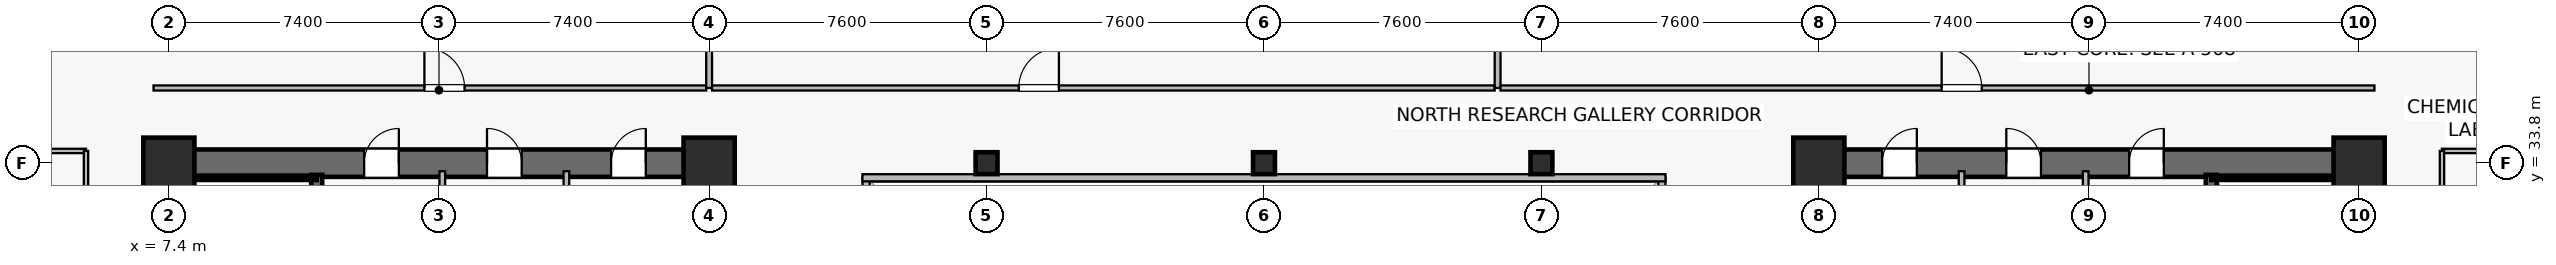
"""IFC4 building model, lengths in metres.
Left out: names, types, materials, properties, quantities, classifications, styles, units other than length and angle.
Written with IfcOpenShell. Run it as: python <this file> out.ifc"""

import sys

from ifc_helpers import new_model, si_unit, direction, frame, frame_2d, origin, origin_2d, place, context, subcontext, project, spatial, rectangle, hollow_rectangle, extrude, source, transform, mapped, element, fill, save


model = new_model("IFC4")
c1 = context("Model", 3, precision=1e-05, world=origin(), true_north=direction((0.0, 1.0)))
c2 = subcontext(c1, "Body", "Model", "MODEL_VIEW")
j1 = project(units=[si_unit("LENGTHUNIT", "METRE"), si_unit("PLANEANGLEUNIT", "RADIAN")], contexts=[c1])
p1 = place(None, origin())
s1 = spatial("IfcSite", under=j1, at=p1, CompositionType="ELEMENT")
p2 = place(p1, origin())
s2 = spatial("IfcBuilding", under=s1, at=p2, CompositionType="ELEMENT")
p3 = place(p2, frame((0.0, 0.0, 45.7)))
s3 = spatial("IfcBuildingStorey", under=s2, at=p3, CompositionType="ELEMENT", Elevation=45.7)
p4 = place(p3, frame((7.025, 33.8, 0.0), z_axis=(0.0, 0.0, 1.0), x_axis=(1.0, 0.0, 0.0)))
e1 = element("IfcWall", 1, at=p4, inside=s3, PredefinedType="SHEAR", context=c2, shape_type="SweptSolid", body=[
    extrude(rectangle(XDim=15.55, YDim=0.75, at=frame_2d((7.775, 0.0))), origin(), (0.0, 0.0, 1.0), 3.78),
])
p5 = place(p4, frame((5.725, 0.0, 0.0)))
e2 = element("IfcOpeningElement", 2, at=p5, cuts=e1, PredefinedType="OPENING", context=c2, shape_type="SweptSolid", body=[
    extrude(rectangle(XDim=0.95, YDim=2.15, at=frame_2d((0.475, 1.075))), frame((0.0, 0.385, 0.0), z_axis=(0.0, -1.0, 0.0), x_axis=(1.0, 0.0, 0.0)), (0.0, 0.0, 1.0), 0.77),
])
p6 = place(p4, frame((9.09, 0.0, 0.0)))
e3 = element("IfcOpeningElement", 3, at=p6, cuts=e1, PredefinedType="OPENING", context=c2, shape_type="SweptSolid", body=[
    extrude(rectangle(XDim=0.95, YDim=2.15, at=frame_2d((0.475, 1.075))), frame((0.0, 0.385, 0.0), z_axis=(0.0, -1.0, 0.0), x_axis=(1.0, 0.0, 0.0)), (0.0, 0.0, 1.0), 0.77),
])
p7 = place(p4, frame((12.49, 0.0, 0.0)))
e4 = element("IfcOpeningElement", 4, at=p7, cuts=e1, PredefinedType="OPENING", context=c2, shape_type="SweptSolid", body=[
    extrude(rectangle(XDim=0.95, YDim=2.15, at=frame_2d((0.475, 1.075))), frame((0.0, 0.385, 0.0), z_axis=(0.0, -1.0, 0.0), x_axis=(1.0, 0.0, 0.0)), (0.0, 0.0, 1.0), 0.77),
])
p8 = place(p3, frame((7.4, 15.175, 0.0), z_axis=(0.0, 0.0, 1.0), x_axis=(0.0, 1.0, 0.0)))
e5 = element("IfcWall", 5, at=p8, inside=s3, PredefinedType="SHEAR", context=c2, shape_type="SweptSolid", body=[
    extrude(rectangle(XDim=18.25, YDim=0.75, at=frame_2d((9.125, 0.0))), origin(), (0.0, 0.0, 1.0), 3.78),
])
p9 = place(p3, frame((22.2, 15.175, 0.0), z_axis=(0.0, 0.0, 1.0), x_axis=(0.0, 1.0, 0.0)))
e6 = element("IfcWall", 6, at=p9, inside=s3, PredefinedType="SHEAR", context=c2, shape_type="SweptSolid", body=[
    extrude(rectangle(XDim=18.25, YDim=0.75, at=frame_2d((9.125, 0.0))), origin(), (0.0, 0.0, 1.0), 3.78),
])
p10 = place(p9, frame((3.375, 0.0, 0.0)))
e7 = element("IfcOpeningElement", 7, at=p10, cuts=e6, PredefinedType="OPENING", context=c2, shape_type="SweptSolid", body=[
    extrude(rectangle(XDim=1.42, YDim=2.2, at=frame_2d((0.71, 1.1))), frame((0.0, 0.385, 0.0), z_axis=(0.0, -1.0, 0.0), x_axis=(1.0, 0.0, 0.0)), (0.0, 0.0, 1.0), 0.77),
])
p11 = place(p3, frame((11.45, 24.85, 0.0), z_axis=(0.0, 0.0, 1.0), x_axis=(0.0, 1.0, 0.0)))
e8 = element("IfcWall", 8, at=p11, inside=s3, PredefinedType="SHEAR", context=c2, shape_type="SweptSolid", body=[
    extrude(rectangle(XDim=8.63, YDim=0.3, at=frame_2d((4.315, 0.0))), origin(), (0.0, 0.0, 1.0), 3.78),
])
p12 = place(p11, frame((0.42, 0.0, 0.0)))
e9 = element("IfcOpeningElement", 9, at=p12, cuts=e8, PredefinedType="OPENING", context=c2, shape_type="SweptSolid", body=[
    extrude(rectangle(XDim=1.1, YDim=2.15, at=frame_2d((0.55, 1.075))), frame((0.0, 0.16, 0.0), z_axis=(0.0, -1.0, 0.0), x_axis=(1.0, 0.0, 0.0)), (0.0, 0.0, 1.0), 0.32),
])
p13 = place(p3, frame((7.73, 33.4, 0.0), z_axis=(0.0, 0.0, 1.0), x_axis=(1.0, 0.0, 0.0)))
e10 = element("IfcWall", 10, at=p13, inside=s3, PredefinedType="SOLIDWALL", context=c2, shape_type="SweptSolid", body=[
    extrude(rectangle(XDim=3.72, YDim=0.12, at=frame_2d((1.86, 0.0))), origin(), (0.0, 0.0, 1.0), 3.78),
])
p14 = place(p3, frame((52.225, 33.8, 0.0), z_axis=(0.0, 0.0, 1.0), x_axis=(1.0, 0.0, 0.0)))
e11 = element("IfcWall", 11, at=p14, inside=s3, PredefinedType="SHEAR", context=c2, shape_type="SweptSolid", body=[
    extrude(rectangle(XDim=15.55, YDim=0.75, at=frame_2d((7.775, 0.0))), origin(), (0.0, 0.0, 1.0), 3.78),
])
p15 = place(p14, frame((8.875, 0.0, 0.0)))
e12 = element("IfcOpeningElement", 12, at=p15, cuts=e11, PredefinedType="OPENING", context=c2, shape_type="SweptSolid", body=[
    extrude(rectangle(XDim=0.95, YDim=2.15, at=frame_2d((0.475, 1.075))), frame((0.0, 0.385, 0.0), z_axis=(0.0, -1.0, 0.0), x_axis=(1.0, 0.0, 0.0)), (0.0, 0.0, 1.0), 0.77),
])
p16 = place(p14, frame((5.51, 0.0, 0.0)))
e13 = element("IfcOpeningElement", 13, at=p16, cuts=e11, PredefinedType="OPENING", context=c2, shape_type="SweptSolid", body=[
    extrude(rectangle(XDim=0.95, YDim=2.15, at=frame_2d((0.475, 1.075))), frame((0.0, 0.385, 0.0), z_axis=(0.0, -1.0, 0.0), x_axis=(1.0, 0.0, 0.0)), (0.0, 0.0, 1.0), 0.77),
])
p17 = place(p14, frame((2.11, 0.0, 0.0)))
e14 = element("IfcOpeningElement", 14, at=p17, cuts=e11, PredefinedType="OPENING", context=c2, shape_type="SweptSolid", body=[
    extrude(rectangle(XDim=0.95, YDim=2.15, at=frame_2d((0.475, 1.075))), frame((0.0, 0.385, 0.0), z_axis=(0.0, -1.0, 0.0), x_axis=(1.0, 0.0, 0.0)), (0.0, 0.0, 1.0), 0.77),
])
p18 = place(p3, frame((52.6, 15.175, 0.0), z_axis=(0.0, 0.0, 1.0), x_axis=(0.0, 1.0, 0.0)))
e15 = element("IfcWall", 15, at=p18, inside=s3, PredefinedType="SHEAR", context=c2, shape_type="SweptSolid", body=[
    extrude(rectangle(XDim=18.25, YDim=0.75, at=frame_2d((9.125, 0.0))), origin(), (0.0, 0.0, 1.0), 3.78),
])
p19 = place(p18, frame((3.375, 0.0, 0.0)))
e16 = element("IfcOpeningElement", 16, at=p19, cuts=e15, PredefinedType="OPENING", context=c2, shape_type="SweptSolid", body=[
    extrude(rectangle(XDim=1.42, YDim=2.2, at=frame_2d((0.71, 1.1))), frame((0.0, 0.385, 0.0), z_axis=(0.0, -1.0, 0.0), x_axis=(1.0, 0.0, 0.0)), (0.0, 0.0, 1.0), 0.77),
])
p20 = place(p3, frame((67.4, 15.175, 0.0), z_axis=(0.0, 0.0, 1.0), x_axis=(0.0, 1.0, 0.0)))
e17 = element("IfcWall", 17, at=p20, inside=s3, PredefinedType="SHEAR", context=c2, shape_type="SweptSolid", body=[
    extrude(rectangle(XDim=18.25, YDim=0.75, at=frame_2d((9.125, 0.0))), origin(), (0.0, 0.0, 1.0), 3.78),
])
p21 = place(p3, frame((63.35, 24.85, 0.0), z_axis=(0.0, 0.0, 1.0), x_axis=(0.0, 1.0, 0.0)))
e18 = element("IfcWall", 18, at=p21, inside=s3, PredefinedType="SHEAR", context=c2, shape_type="SweptSolid", body=[
    extrude(rectangle(XDim=8.63, YDim=0.3, at=frame_2d((4.315, 0.0))), origin(), (0.0, 0.0, 1.0), 3.78),
])
p22 = place(p21, frame((0.42, 0.0, 0.0)))
e19 = element("IfcOpeningElement", 19, at=p22, cuts=e18, PredefinedType="OPENING", context=c2, shape_type="SweptSolid", body=[
    extrude(rectangle(XDim=1.1, YDim=2.15, at=frame_2d((0.55, 1.075))), frame((0.0, 0.16, 0.0), z_axis=(0.0, -1.0, 0.0), x_axis=(1.0, 0.0, 0.0)), (0.0, 0.0, 1.0), 0.32),
])
p23 = place(p3, frame((63.35, 33.4, 0.0), z_axis=(0.0, 0.0, 1.0), x_axis=(1.0, 0.0, 0.0)))
e20 = element("IfcWall", 20, at=p23, inside=s3, PredefinedType="SOLIDWALL", context=c2, shape_type="SweptSolid", body=[
    extrude(rectangle(XDim=3.72, YDim=0.12, at=frame_2d((1.86, 0.0))), origin(), (0.0, 0.0, 1.0), 3.78),
])
m1 = source(origin(), c2, "Body", "SweptSolid", [
    extrude(rectangle(XDim=1.4, YDim=1.4, at=origin_2d()), origin(), (0.0, 0.0, 1.0), 4.1),
])
for number, where, z_axis, x_axis in (
    (21, (7.4, 33.8, 0.0), (0.0, 0.0, 1.0), (1.0, 0.0, 0.0)),
    (22, (22.2, 33.8, 0.0), (0.0, 0.0, 1.0), (1.0, 0.0, 0.0)),
    (23, (52.6, 33.8, 0.0), (0.0, 0.0, 1.0), (1.0, 0.0, 0.0)),
    (24, (67.4, 33.8, 0.0), (0.0, 0.0, 1.0), (1.0, 0.0, 0.0)),
):
    element("IfcColumn", number, at=place(p3, frame(where, z_axis=z_axis, x_axis=x_axis)), inside=s3, PredefinedType="COLUMN", context=c2, shape_type="MappedRepresentation", body=[
        mapped(m1, transform((0.0, 0.0, 0.0), scale=1.0)),
    ])
m2 = source(origin(), c2, "Body", "SweptSolid", [
    extrude(hollow_rectangle(XDim=0.6, YDim=0.6, WallThickness=0.028, at=origin_2d()), origin(), (0.0, 0.0, 1.0), 4.1),
])
for number, where, z_axis, x_axis in (
    (25, (29.8, 33.8, 0.0), (0.0, 0.0, 1.0), (1.0, 0.0, 0.0)),
    (26, (37.4, 33.8, 0.0), (0.0, 0.0, 1.0), (1.0, 0.0, 0.0)),
    (27, (45.0, 33.8, 0.0), (0.0, 0.0, 1.0), (1.0, 0.0, 0.0)),
):
    element("IfcColumn", number, at=place(p3, frame(where, z_axis=z_axis, x_axis=x_axis)), inside=s3, PredefinedType="COLUMN", context=c2, shape_type="MappedRepresentation", body=[
        mapped(m2, transform((0.0, 0.0, 0.0), scale=1.0)),
    ])
p24 = place(p3, frame((14.89, 29.65, 0.0), z_axis=(0.0, 0.0, 1.0), x_axis=(0.0, 1.0, 0.0)))
e28 = element("IfcWall", 28, at=p24, inside=s3, PredefinedType="PLUMBINGWALL", context=c2, shape_type="SweptSolid", body=[
    extrude(rectangle(XDim=3.93, YDim=0.155, at=frame_2d((1.965, 0.0))), origin(), (0.0, 0.0, 1.0), 3.065),
])
p25 = place(p3, frame((18.29, 29.65, 0.0), z_axis=(0.0, 0.0, 1.0), x_axis=(0.0, 1.0, 0.0)))
e29 = element("IfcWall", 29, at=p25, inside=s3, PredefinedType="PLUMBINGWALL", context=c2, shape_type="SweptSolid", body=[
    extrude(rectangle(XDim=3.93, YDim=0.155, at=frame_2d((1.965, 0.0))), origin(), (0.0, 0.0, 1.0), 3.78),
])
p26 = place(p3, frame((59.91, 29.65, 0.0), z_axis=(0.0, 0.0, 1.0), x_axis=(0.0, 1.0, 0.0)))
e30 = element("IfcWall", 30, at=p26, inside=s3, PredefinedType="PLUMBINGWALL", context=c2, shape_type="SweptSolid", body=[
    extrude(rectangle(XDim=3.93, YDim=0.155, at=frame_2d((1.965, 0.0))), origin(), (0.0, 0.0, 1.0), 3.065),
])
p27 = place(p3, frame((56.51, 29.65, 0.0), z_axis=(0.0, 0.0, 1.0), x_axis=(0.0, 1.0, 0.0)))
e31 = element("IfcWall", 31, at=p27, inside=s3, PredefinedType="PLUMBINGWALL", context=c2, shape_type="SweptSolid", body=[
    extrude(rectangle(XDim=3.93, YDim=0.155, at=frame_2d((1.965, 0.0))), origin(), (0.0, 0.0, 1.0), 3.78),
])
p28 = place(p3, frame((26.5, 15.2, 0.0), z_axis=(0.0, 0.0, 1.0), x_axis=(0.0, 1.0, 0.0)))
e32 = element("IfcWall", 32, at=p28, inside=s3, PredefinedType="SOLIDWALL", context=c2, shape_type="SweptSolid", body=[
    extrude(rectangle(XDim=18.2, YDim=0.195, at=frame_2d((9.1, 0.0))), origin(), (0.0, 0.0, 1.0), 3.78),
])
p29 = place(p28, frame((1.8, 0.0, 0.9)))
e33 = element("IfcOpeningElement", 33, at=p29, cuts=e32, PredefinedType="OPENING", context=c2, shape_type="SweptSolid", body=[
    extrude(rectangle(XDim=1.2, YDim=1.35, at=frame_2d((0.6, 0.675))), frame((0.0, 0.107, 0.0), z_axis=(0.0, -1.0, 0.0), x_axis=(1.0, 0.0, 0.0)), (0.0, 0.0, 1.0), 0.215),
])
p30 = place(p28, frame((13.2, 0.0, 0.9)))
e34 = element("IfcOpeningElement", 34, at=p30, cuts=e32, PredefinedType="OPENING", context=c2, shape_type="SweptSolid", body=[
    extrude(rectangle(XDim=1.2, YDim=1.35, at=frame_2d((0.6, 0.675))), frame((0.0, 0.107, 0.0), z_axis=(0.0, -1.0, 0.0), x_axis=(1.0, 0.0, 0.0)), (0.0, 0.0, 1.0), 0.215),
])
p31 = place(p3, frame((48.3, 15.2, 0.0), z_axis=(0.0, 0.0, 1.0), x_axis=(0.0, 1.0, 0.0)))
e35 = element("IfcWall", 35, at=p31, inside=s3, PredefinedType="SOLIDWALL", context=c2, shape_type="SweptSolid", body=[
    extrude(rectangle(XDim=18.2, YDim=0.195, at=frame_2d((9.1, 0.0))), origin(), (0.0, 0.0, 1.0), 3.78),
])
p32 = place(p31, frame((1.8, 0.0, 0.9)))
e36 = element("IfcOpeningElement", 36, at=p32, cuts=e35, PredefinedType="OPENING", context=c2, shape_type="SweptSolid", body=[
    extrude(rectangle(XDim=1.2, YDim=1.35, at=frame_2d((0.6, 0.675))), frame((0.0, 0.107, 0.0), z_axis=(0.0, -1.0, 0.0), x_axis=(1.0, 0.0, 0.0)), (0.0, 0.0, 1.0), 0.215),
])
p33 = place(p31, frame((13.2, 0.0, 0.9)))
e37 = element("IfcOpeningElement", 37, at=p33, cuts=e35, PredefinedType="OPENING", context=c2, shape_type="SweptSolid", body=[
    extrude(rectangle(XDim=1.2, YDim=1.35, at=frame_2d((0.6, 0.675))), frame((0.0, 0.107, 0.0), z_axis=(0.0, -1.0, 0.0), x_axis=(1.0, 0.0, 0.0)), (0.0, 0.0, 1.0), 0.215),
])
p34 = place(p3, frame((26.4, 33.4, 0.0), z_axis=(0.0, 0.0, 1.0), x_axis=(1.0, 0.0, 0.0)))
e38 = element("IfcWall", 38, at=p34, inside=s3, PredefinedType="SOLIDWALL", context=c2, shape_type="SweptSolid", body=[
    extrude(rectangle(XDim=22.0, YDim=0.195, at=frame_2d((11.0, 0.0))), origin(), (0.0, 0.0, 1.0), 3.78),
])
p35 = place(p3, frame((6.98, 35.86, 0.0), z_axis=(0.0, 0.0, 1.0), x_axis=(1.0, 0.0, 0.0)))
e39 = element("IfcWall", 39, at=p35, inside=s3, PredefinedType="PARTITIONING", context=c2, shape_type="SweptSolid", body=[
    extrude(rectangle(XDim=15.14, YDim=0.14, at=frame_2d((7.57, 0.0))), origin(), (0.0, 0.0, 1.0), 3.065),
])
p36 = place(p35, frame((7.42, 0.0, 0.0)))
e40 = element("IfcOpeningElement", 40, at=p36, cuts=e39, PredefinedType="OPENING", context=c2, shape_type="SweptSolid", body=[
    extrude(rectangle(XDim=1.1, YDim=2.18, at=frame_2d((0.55, 1.09))), frame((0.0, 0.08, 0.0), z_axis=(0.0, -1.0, 0.0), x_axis=(1.0, 0.0, 0.0)), (0.0, 0.0, 1.0), 0.16),
])
p37 = place(p3, frame((22.2, 35.86, 0.0), z_axis=(0.0, 0.0, 1.0), x_axis=(0.0, 1.0, 0.0)))
e41 = element("IfcWall", 41, at=p37, inside=s3, PredefinedType="PARTITIONING", context=c2, shape_type="SweptSolid", body=[
    extrude(rectangle(XDim=12.63, YDim=0.16, at=frame_2d((6.315, 0.0))), origin(), (0.0, 0.0, 1.0), 3.015),
])
p38 = place(p3, frame((22.28, 35.86, 0.0), z_axis=(0.0, 0.0, 1.0), x_axis=(1.0, 0.0, 0.0)))
e42 = element("IfcWall", 42, at=p38, inside=s3, PredefinedType="PARTITIONING", context=c2, shape_type="SweptSolid", body=[
    extrude(rectangle(XDim=21.44, YDim=0.14, at=frame_2d((10.72, 0.0))), origin(), (0.0, 0.0, 1.0), 3.065),
])
p39 = place(p38, frame((8.402, 0.0, 0.0)))
e43 = element("IfcOpeningElement", 43, at=p39, cuts=e42, PredefinedType="OPENING", context=c2, shape_type="SweptSolid", body=[
    extrude(rectangle(XDim=1.1, YDim=2.18, at=frame_2d((0.55, 1.09))), frame((0.0, 0.08, 0.0), z_axis=(0.0, -1.0, 0.0), x_axis=(1.0, 0.0, 0.0)), (0.0, 0.0, 1.0), 0.16),
])
p40 = place(p3, frame((43.8, 35.86, 0.0), z_axis=(0.0, 0.0, 1.0), x_axis=(0.0, 1.0, 0.0)))
e44 = element("IfcWall", 44, at=p40, inside=s3, PredefinedType="PARTITIONING", context=c2, shape_type="SweptSolid", body=[
    extrude(rectangle(XDim=11.43, YDim=0.16, at=frame_2d((5.715, 0.0))), origin(), (0.0, 0.0, 1.0), 3.015),
])
p41 = place(p3, frame((43.88, 35.86, 0.0), z_axis=(0.0, 0.0, 1.0), x_axis=(1.0, 0.0, 0.0)))
e45 = element("IfcWall", 45, at=p41, inside=s3, PredefinedType="PARTITIONING", context=c2, shape_type="SweptSolid", body=[
    extrude(rectangle(XDim=23.94, YDim=0.14, at=frame_2d((11.97, 0.0))), origin(), (0.0, 0.0, 1.0), 3.065),
])
p42 = place(p41, frame((12.084, 0.0, 0.0)))
e46 = element("IfcOpeningElement", 46, at=p42, cuts=e45, PredefinedType="OPENING", context=c2, shape_type="SweptSolid", body=[
    extrude(rectangle(XDim=1.1, YDim=2.18, at=frame_2d((0.55, 1.09))), frame((0.0, 0.08, 0.0), z_axis=(0.0, -1.0, 0.0), x_axis=(1.0, 0.0, 0.0)), (0.0, 0.0, 1.0), 0.16),
])
p43 = place(p3, frame((0.11, 34.135, 0.0), z_axis=(0.0, 0.0, 1.0), x_axis=(1.0, 0.0, 0.0)))
e47 = element("IfcWall", 47, at=p43, inside=s3, PredefinedType="PARTITIONING", context=c2, shape_type="SweptSolid", body=[
    extrude(rectangle(XDim=5.02, YDim=0.12, at=frame_2d((2.51, 0.0))), origin(), (0.0, 0.0, 1.0), 3.78),
])
p44 = place(p3, frame((5.13, 25.26, 0.0), z_axis=(0.0, 0.0, 1.0), x_axis=(0.0, 1.0, 0.0)))
e48 = element("IfcWall", 48, at=p44, inside=s3, PredefinedType="PARTITIONING", context=c2, shape_type="SweptSolid", body=[
    extrude(rectangle(XDim=8.875, YDim=0.12, at=frame_2d((4.438, 0.0))), origin(), (0.0, 0.0, 1.0), 3.78),
])
p45 = place(p44, frame((3.988, 0.0, 0.0)))
e49 = element("IfcOpeningElement", 49, at=p45, cuts=e48, PredefinedType="OPENING", context=c2, shape_type="SweptSolid", body=[
    extrude(rectangle(XDim=0.9, YDim=2.1, at=frame_2d((0.45, 1.05))), frame((0.0, 0.07, 0.0), z_axis=(0.0, -1.0, 0.0), x_axis=(1.0, 0.0, 0.0)), (0.0, 0.0, 1.0), 0.14),
])
p46 = place(p3, frame((69.67, 34.135, 0.0), z_axis=(0.0, 0.0, 1.0), x_axis=(1.0, 0.0, 0.0)))
e50 = element("IfcWall", 50, at=p46, inside=s3, PredefinedType="PARTITIONING", context=c2, shape_type="SweptSolid", body=[
    extrude(rectangle(XDim=5.02, YDim=0.12, at=frame_2d((2.51, 0.0))), origin(), (0.0, 0.0, 1.0), 3.78),
])
p47 = place(p3, frame((69.67, 28.06, 0.0), z_axis=(0.0, 0.0, 1.0), x_axis=(0.0, 1.0, 0.0)))
e51 = element("IfcWall", 51, at=p47, inside=s3, PredefinedType="PARTITIONING", context=c2, shape_type="SweptSolid", body=[
    extrude(rectangle(XDim=6.075, YDim=0.12, at=frame_2d((3.038, 0.0))), origin(), (0.0, 0.0, 1.0), 3.78),
])
p48 = place(p47, frame((2.587, 0.0, 0.0)))
e52 = element("IfcOpeningElement", 52, at=p48, cuts=e51, PredefinedType="OPENING", context=c2, shape_type="SweptSolid", body=[
    extrude(rectangle(XDim=0.9, YDim=2.1, at=frame_2d((0.45, 1.05))), frame((0.0, 0.07, 0.0), z_axis=(0.0, -1.0, 0.0), x_axis=(1.0, 0.0, 0.0)), (0.0, 0.0, 1.0), 0.14),
])
m3 = source(origin(), c2, "Body", "SweptSolid", [
    extrude(rectangle(XDim=0.95, YDim=2.15, at=frame_2d((0.475, 1.075))), frame((0.0, 0.025, 0.0), z_axis=(0.0, -1.0, 0.0), x_axis=(1.0, 0.0, 0.0)), (0.0, 0.0, 1.0), 0.05),
])
p49 = place(p5, origin())
e53 = element("IfcDoor", 53, at=p49, inside=s3, OperationType="SINGLE_SWING_RIGHT", PredefinedType="DOOR", context=c2, shape_type="MappedRepresentation", body=[
    mapped(m3, transform((0.0, 0.0, 0.0), scale=1.0)),
])
fill(e2, e53)
p50 = place(p6, origin())
e54 = element("IfcDoor", 54, at=p50, inside=s3, OperationType="SINGLE_SWING_LEFT", PredefinedType="DOOR", context=c2, shape_type="MappedRepresentation", body=[
    mapped(m3, transform((0.0, 0.0, 0.0), scale=1.0)),
])
fill(e3, e54)
p51 = place(p7, origin())
e55 = element("IfcDoor", 55, at=p51, inside=s3, OperationType="SINGLE_SWING_RIGHT", PredefinedType="DOOR", context=c2, shape_type="MappedRepresentation", body=[
    mapped(m3, transform((0.0, 0.0, 0.0), scale=1.0)),
])
fill(e4, e55)
p52 = place(p15, origin())
e56 = element("IfcDoor", 56, at=p52, inside=s3, OperationType="SINGLE_SWING_RIGHT", PredefinedType="DOOR", context=c2, shape_type="MappedRepresentation", body=[
    mapped(m3, transform((0.0, 0.0, 0.0), scale=1.0)),
])
fill(e12, e56)
p53 = place(p16, origin())
e57 = element("IfcDoor", 57, at=p53, inside=s3, OperationType="SINGLE_SWING_LEFT", PredefinedType="DOOR", context=c2, shape_type="MappedRepresentation", body=[
    mapped(m3, transform((0.0, 0.0, 0.0), scale=1.0)),
])
fill(e13, e57)
p54 = place(p17, origin())
e58 = element("IfcDoor", 58, at=p54, inside=s3, OperationType="SINGLE_SWING_RIGHT", PredefinedType="DOOR", context=c2, shape_type="MappedRepresentation", body=[
    mapped(m3, transform((0.0, 0.0, 0.0), scale=1.0)),
])
fill(e14, e58)
m4 = source(origin(), c2, "Body", "SweptSolid", [
    extrude(rectangle(XDim=1.1, YDim=2.18, at=frame_2d((0.55, 1.09))), frame((0.0, 0.025, 0.0), z_axis=(0.0, -1.0, 0.0), x_axis=(1.0, 0.0, 0.0)), (0.0, 0.0, 1.0), 0.05),
])
p55 = place(p36, origin())
e59 = element("IfcDoor", 59, at=p55, inside=s3, OperationType="SINGLE_SWING_LEFT", PredefinedType="DOOR", context=c2, shape_type="MappedRepresentation", body=[
    mapped(m4, transform((0.0, 0.0, 0.0), scale=1.0)),
])
fill(e40, e59)
p56 = place(p39, origin())
e60 = element("IfcDoor", 60, at=p56, inside=s3, OperationType="SINGLE_SWING_RIGHT", PredefinedType="DOOR", context=c2, shape_type="MappedRepresentation", body=[
    mapped(m4, transform((0.0, 0.0, 0.0), scale=1.0)),
])
fill(e43, e60)
p57 = place(p42, origin())
e61 = element("IfcDoor", 61, at=p57, inside=s3, OperationType="SINGLE_SWING_LEFT", PredefinedType="DOOR", context=c2, shape_type="MappedRepresentation", body=[
    mapped(m4, transform((0.0, 0.0, 0.0), scale=1.0)),
])
fill(e46, e61)
save(model, sys.argv[1])
